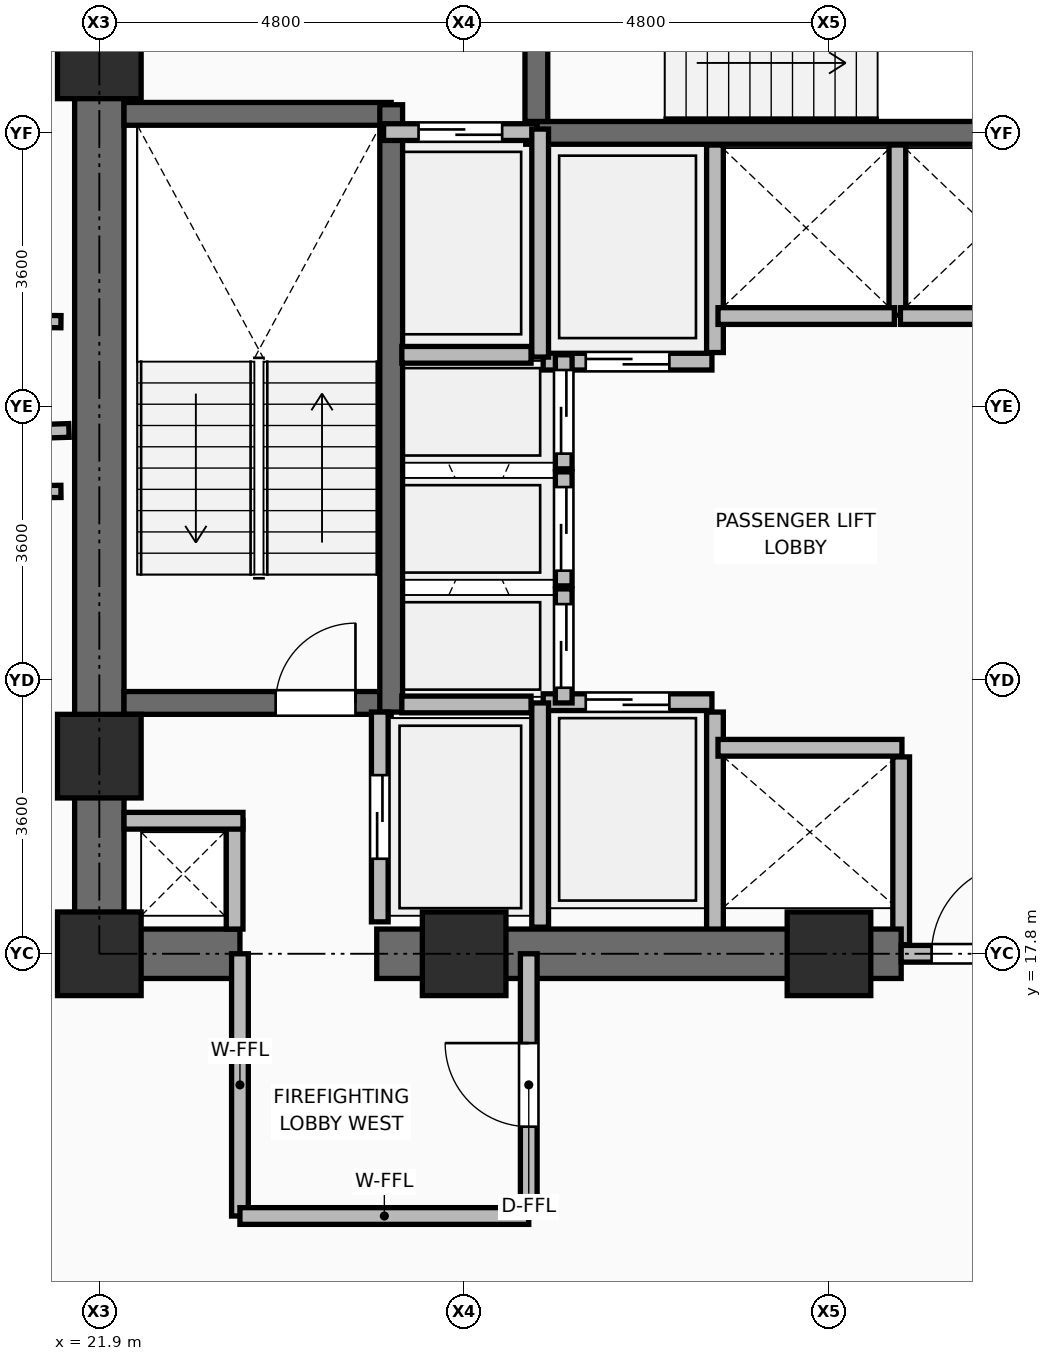
"""IFC4 building model, lengths in metres.
Left out: names, types, materials, properties, quantities, classifications, styles, units other than length and angle.
Written with IfcOpenShell. Run it as: python <this file> out.ifc"""

import sys

from ifc_helpers import new_model, si_unit, direction, frame, frame_2d, origin, origin_2d, place, context, subcontext, project, spatial, rectangle, extrude, element, fill, save


model = new_model("IFC4")
c1 = context("Model", 3, precision=1e-05, world=origin(), true_north=direction((0.0, 1.0)))
c2 = subcontext(c1, "Body", "Model", "MODEL_VIEW")
j1 = project(units=[si_unit("LENGTHUNIT", "METRE"), si_unit("PLANEANGLEUNIT", "RADIAN")], contexts=[c1])
p1 = place(None, origin())
s1 = spatial("IfcSite", under=j1, at=p1, CompositionType="ELEMENT")
p2 = place(p1, origin())
s2 = spatial("IfcBuilding", under=s1, at=p2, CompositionType="ELEMENT")
p3 = place(p2, frame((0.0, 0.0, 87.0)))
s3 = spatial("IfcBuildingStorey", under=s2, at=p3, CompositionType="ELEMENT", Elevation=87.0)
for number, where, z_axis, x_axis in (
    (1, (21.9, 17.8, 0.0), (0.0, 0.0, 1.0), (1.0, 0.0, 0.0)),
    (2, (26.7, 17.8, 0.0), (0.0, 0.0, 1.0), (1.0, 0.0, 0.0)),
    (3, (31.5, 17.8, 0.0), (0.0, 0.0, 1.0), (1.0, 0.0, 0.0)),
    (4, (21.9, 20.4, 0.0), (0.0, 0.0, 1.0), (1.0, 0.0, 0.0)),
    (5, (21.9, 29.6, 0.0), (0.0, 0.0, 1.0), (1.0, 0.0, 0.0)),
):
    element("IfcColumn", number, at=place(p3, frame(where, z_axis=z_axis, x_axis=x_axis)), inside=s3, PredefinedType="COLUMN", context=c2, shape_type="SweptSolid", body=[
        extrude(rectangle(XDim=1.1, YDim=1.1, at=origin_2d()), origin(), (0.0, 0.0, 1.0), 3.75),
    ])
p4 = place(p3, frame((30.0, 18.08, 0.0), z_axis=(0.0, 0.0, 1.0), x_axis=(0.0, 1.0, 0.0)))
e6 = element("IfcWall", 6, at=p4, inside=s3, PredefinedType="PARTITIONING", context=c2, shape_type="SweptSolid", body=[
    extrude(rectangle(XDim=2.9, YDim=0.22, at=frame_2d((1.45, 0.0))), origin(), (0.0, 0.0, 1.0), 3.475),
])
p5 = place(p3, frame((32.45, 17.92, 0.0), z_axis=(0.0, 0.0, 1.0), x_axis=(0.0, 1.0, 0.0)))
e7 = element("IfcWall", 7, at=p5, inside=s3, PredefinedType="PARTITIONING", context=c2, shape_type="SweptSolid", body=[
    extrude(rectangle(XDim=2.47, YDim=0.22, at=frame_2d((1.235, 0.0))), origin(), (0.0, 0.0, 1.0), 2.858),
])
p6 = place(p3, frame((30.0, 25.71, 0.0), z_axis=(0.0, 0.0, 1.0), x_axis=(0.0, 1.0, 0.0)))
e8 = element("IfcWall", 8, at=p6, inside=s3, PredefinedType="PARTITIONING", context=c2, shape_type="SweptSolid", body=[
    extrude(rectangle(XDim=2.73, YDim=0.22, at=frame_2d((1.365, 0.0))), origin(), (0.0, 0.0, 1.0), 3.475),
])
p7 = place(p3, frame((32.4, 26.2, 0.0), z_axis=(0.0, 0.0, 1.0), x_axis=(0.0, 1.0, 0.0)))
e9 = element("IfcWall", 9, at=p7, inside=s3, PredefinedType="PARTITIONING", context=c2, shape_type="SweptSolid", body=[
    extrude(rectangle(XDim=2.24, YDim=0.22, at=frame_2d((1.12, 0.0))), origin(), (0.0, 0.0, 1.0), 3.475),
])
p8 = place(p3, frame((21.575, 17.8, 0.0), z_axis=(0.0, 0.0, 1.0), x_axis=(1.0, 0.0, 0.0)))
e10 = element("IfcWall", 10, at=p8, inside=s3, PredefinedType="SHEAR", context=c2, shape_type="SweptSolid", body=[
    extrude(rectangle(XDim=2.175, YDim=0.65, at=frame_2d((1.087, 0.0))), origin(), (0.0, 0.0, 1.0), 3.5),
])
p9 = place(p3, frame((25.55, 17.8, 0.0), z_axis=(0.0, 0.0, 1.0), x_axis=(1.0, 0.0, 0.0)))
e11 = element("IfcWall", 11, at=p9, inside=s3, PredefinedType="SHEAR", context=c2, shape_type="SweptSolid", body=[
    extrude(rectangle(XDim=6.9, YDim=0.65, at=frame_2d((3.45, 0.0))), origin(), (0.0, 0.0, 1.0), 3.5),
])
p10 = place(p3, frame((32.45, 17.8, 0.0), z_axis=(0.0, 0.0, 1.0), x_axis=(1.0, 0.0, 0.0)))
e12 = element("IfcWall", 12, at=p10, inside=s3, PredefinedType="PARTITIONING", context=c2, shape_type="SweptSolid", body=[
    extrude(rectangle(XDim=2.5, YDim=0.22, at=frame_2d((1.25, 0.0))), origin(), (0.0, 0.0, 1.0), 2.858),
])
p11 = place(p10, frame((0.4, 0.0, 0.0)))
e13 = element("IfcOpeningElement", 13, at=p11, cuts=e12, PredefinedType="OPENING", context=c2, shape_type="SweptSolid", body=[
    extrude(rectangle(XDim=1.2, YDim=2.1, at=frame_2d((0.6, 1.05))), frame((0.0, 0.12, 0.0), z_axis=(0.0, -1.0, 0.0), x_axis=(1.0, 0.0, 0.0)), (0.0, 0.0, 1.0), 0.24),
])
p12 = place(p3, frame((21.9, 18.125, 0.0), z_axis=(0.0, 0.0, 1.0), x_axis=(0.0, 1.0, 0.0)))
e14 = element("IfcWall", 14, at=p12, inside=s3, PredefinedType="SHEAR", context=c2, shape_type="SweptSolid", body=[
    extrude(rectangle(XDim=14.0, YDim=0.65, at=frame_2d((7.0, 0.0))), origin(), (0.0, 0.0, 1.0), 3.5),
])
p13 = place(p3, frame((22.225, 21.1, 0.0), z_axis=(0.0, 0.0, 1.0), x_axis=(1.0, 0.0, 0.0)))
e15 = element("IfcWall", 15, at=p13, inside=s3, PredefinedType="SHEAR", context=c2, shape_type="SweptSolid", body=[
    extrude(rectangle(XDim=3.515, YDim=0.3, at=frame_2d((1.757, 0.0))), origin(), (0.0, 0.0, 1.0), 3.5),
])
p14 = place(p13, frame((1.995, 0.0, 0.0)))
e16 = element("IfcOpeningElement", 16, at=p14, cuts=e15, PredefinedType="OPENING", context=c2, shape_type="SweptSolid", body=[
    extrude(rectangle(XDim=1.05, YDim=2.1, at=frame_2d((0.525, 1.05))), frame((0.0, 0.16, 0.0), z_axis=(0.0, -1.0, 0.0), x_axis=(1.0, 0.0, 0.0)), (0.0, 0.0, 1.0), 0.32),
])
p15 = place(p3, frame((22.225, 28.85, 0.0), z_axis=(0.0, 0.0, 1.0), x_axis=(1.0, 0.0, 0.0)))
e17 = element("IfcWall", 17, at=p15, inside=s3, PredefinedType="SHEAR", context=c2, shape_type="SweptSolid", body=[
    extrude(rectangle(XDim=3.515, YDim=0.3, at=frame_2d((1.757, 0.0))), origin(), (0.0, 0.0, 1.0), 3.5),
])
p16 = place(p3, frame((25.74, 20.98, 0.0), z_axis=(0.0, 0.0, 1.0), x_axis=(0.0, 1.0, 0.0)))
e18 = element("IfcWall", 18, at=p16, inside=s3, PredefinedType="SHEAR", context=c2, shape_type="SweptSolid", body=[
    extrude(rectangle(XDim=7.99, YDim=0.3, at=frame_2d((3.995, 0.0))), origin(), (0.0, 0.0, 1.0), 3.5),
])
p17 = place(p3, frame((27.51, 28.6, 0.0), z_axis=(0.0, 0.0, 1.0), x_axis=(1.0, 0.0, 0.0)))
e19 = element("IfcWall", 19, at=p17, inside=s3, PredefinedType="SHEAR", context=c2, shape_type="SweptSolid", body=[
    extrude(rectangle(XDim=8.03, YDim=0.3, at=frame_2d((4.015, 0.0))), origin(), (0.0, 0.0, 1.0), 3.5),
])
p18 = place(p3, frame((27.65, 28.75, 0.0), z_axis=(0.0, 0.0, 1.0), x_axis=(0.0, 1.0, 0.0)))
e20 = element("IfcWall", 20, at=p18, inside=s3, PredefinedType="SHEAR", context=c2, shape_type="SweptSolid", body=[
    extrude(rectangle(XDim=3.375, YDim=0.3, at=frame_2d((1.688, 0.0))), origin(), (0.0, 0.0, 1.0), 3.5),
])
p19 = place(p18, frame((1.0, 0.0, 0.0)))
e21 = element("IfcOpeningElement", 21, at=p19, cuts=e20, PredefinedType="OPENING", context=c2, shape_type="SweptSolid", body=[
    extrude(rectangle(XDim=1.05, YDim=2.1, at=frame_2d((0.525, 1.05))), frame((0.0, 0.16, 0.0), z_axis=(0.0, -1.0, 0.0), x_axis=(1.0, 0.0, 0.0)), (0.0, 0.0, 1.0), 0.32),
])
p20 = place(p3, frame((23.68, 18.125, 0.0), z_axis=(0.0, 0.0, 1.0), x_axis=(0.0, 1.0, 0.0)))
e22 = element("IfcWall", 22, at=p20, inside=s3, PredefinedType="PARTITIONING", context=c2, shape_type="SweptSolid", body=[
    extrude(rectangle(XDim=1.425, YDim=0.22, at=frame_2d((0.712, 0.0))), origin(), (0.0, 0.0, 1.0), 3.48),
])
p21 = place(p3, frame((22.225, 19.55, 0.0), z_axis=(0.0, 0.0, 1.0), x_axis=(1.0, 0.0, 0.0)))
e23 = element("IfcWall", 23, at=p21, inside=s3, PredefinedType="PARTITIONING", context=c2, shape_type="SweptSolid", body=[
    extrude(rectangle(XDim=1.565, YDim=0.22, at=frame_2d((0.782, 0.0))), origin(), (0.0, 0.0, 1.0), 2.525),
])
p22 = place(p3, frame((25.59, 18.22, 0.0), z_axis=(0.0, 0.0, 1.0), x_axis=(0.0, 1.0, 0.0)))
e24 = element("IfcWall", 24, at=p22, inside=s3, PredefinedType="PARTITIONING", context=c2, shape_type="SweptSolid", body=[
    extrude(rectangle(XDim=2.76, YDim=0.22, at=frame_2d((1.38, 0.0))), origin(), (0.0, 0.0, 1.0), 3.48),
])
p23 = place(p22, frame((0.83, 0.0, 0.0)))
e25 = element("IfcOpeningElement", 25, at=p23, cuts=e24, PredefinedType="OPENING", context=c2, shape_type="SweptSolid", body=[
    extrude(rectangle(XDim=1.1, YDim=2.2, at=frame_2d((0.55, 1.1))), frame((0.0, 0.12, 0.0), z_axis=(0.0, -1.0, 0.0), x_axis=(1.0, 0.0, 0.0)), (0.0, 0.0, 1.0), 0.24),
])
p24 = place(p3, frame((25.64, 28.61, 0.0), z_axis=(0.0, 0.0, 1.0), x_axis=(1.0, 0.0, 0.0)))
e26 = element("IfcWall", 26, at=p24, inside=s3, PredefinedType="PARTITIONING", context=c2, shape_type="SweptSolid", body=[
    extrude(rectangle(XDim=2.02, YDim=0.22, at=frame_2d((1.01, 0.0))), origin(), (0.0, 0.0, 1.0), 3.48),
])
p25 = place(p24, frame((0.46, 0.0, 0.0)))
e27 = element("IfcOpeningElement", 27, at=p25, cuts=e26, PredefinedType="OPENING", context=c2, shape_type="SweptSolid", body=[
    extrude(rectangle(XDim=1.1, YDim=2.2, at=frame_2d((0.55, 1.1))), frame((0.0, 0.12, 0.0), z_axis=(0.0, -1.0, 0.0), x_axis=(1.0, 0.0, 0.0)), (0.0, 0.0, 1.0), 0.24),
])
p26 = place(p3, frame((27.74, 21.11, 0.0), z_axis=(0.0, 0.0, 1.0), x_axis=(1.0, 0.0, 0.0)))
e28 = element("IfcWall", 28, at=p26, inside=s3, PredefinedType="PARTITIONING", context=c2, shape_type="SweptSolid", body=[
    extrude(rectangle(XDim=2.22, YDim=0.22, at=frame_2d((1.11, 0.0))), origin(), (0.0, 0.0, 1.0), 3.48),
])
p27 = place(p26, frame((0.56, 0.0, 0.0)))
e29 = element("IfcOpeningElement", 29, at=p27, cuts=e28, PredefinedType="OPENING", context=c2, shape_type="SweptSolid", body=[
    extrude(rectangle(XDim=1.1, YDim=2.2, at=frame_2d((0.55, 1.1))), frame((0.0, 0.12, 0.0), z_axis=(0.0, -1.0, 0.0), x_axis=(1.0, 0.0, 0.0)), (0.0, 0.0, 1.0), 0.24),
])
p28 = place(p3, frame((27.74, 25.59, 0.0), z_axis=(0.0, 0.0, 1.0), x_axis=(1.0, 0.0, 0.0)))
e30 = element("IfcWall", 30, at=p28, inside=s3, PredefinedType="PARTITIONING", context=c2, shape_type="SweptSolid", body=[
    extrude(rectangle(XDim=2.22, YDim=0.22, at=frame_2d((1.11, 0.0))), origin(), (0.0, 0.0, 1.0), 3.48),
])
p29 = place(p28, frame((0.56, 0.0, 0.0)))
e31 = element("IfcOpeningElement", 31, at=p29, cuts=e30, PredefinedType="OPENING", context=c2, shape_type="SweptSolid", body=[
    extrude(rectangle(XDim=1.1, YDim=2.2, at=frame_2d((0.55, 1.1))), frame((0.0, 0.12, 0.0), z_axis=(0.0, -1.0, 0.0), x_axis=(1.0, 0.0, 0.0)), (0.0, 0.0, 1.0), 0.24),
])
p30 = place(p3, frame((30.04, 20.51, 0.0), z_axis=(0.0, 0.0, 1.0), x_axis=(1.0, 0.0, 0.0)))
e32 = element("IfcWall", 32, at=p30, inside=s3, PredefinedType="PARTITIONING", context=c2, shape_type="SweptSolid", body=[
    extrude(rectangle(XDim=2.42, YDim=0.22, at=frame_2d((1.21, 0.0))), origin(), (0.0, 0.0, 1.0), 3.48),
])
for number, where, z_axis, x_axis in (
    (33, (30.04, 26.19, 0.0), (0.0, 0.0, 1.0), (1.0, 0.0, 0.0)),
    (34, (32.44, 26.19, 0.0), (0.0, 0.0, 1.0), (1.0, 0.0, 0.0)),
):
    element("IfcWall", number, at=place(p3, frame(where, z_axis=z_axis, x_axis=x_axis)), inside=s3, PredefinedType="PARTITIONING", context=c2, shape_type="SweptSolid", body=[
        extrude(rectangle(XDim=2.32, YDim=0.22, at=frame_2d((1.16, 0.0))), origin(), (0.0, 0.0, 1.0), 3.48),
    ])
p31 = place(p3, frame((28.01, 21.1, 0.0), z_axis=(0.0, 0.0, 1.0), x_axis=(0.0, 1.0, 0.0)))
e35 = element("IfcWall", 35, at=p31, inside=s3, PredefinedType="PARTITIONING", context=c2, shape_type="SweptSolid", body=[
    extrude(rectangle(XDim=1.5, YDim=0.22, at=frame_2d((0.75, 0.0))), origin(), (0.0, 0.0, 1.0), 3.48),
])
p32 = place(p31, frame((0.2, 0.0, 0.0)))
e36 = element("IfcOpeningElement", 36, at=p32, cuts=e35, PredefinedType="OPENING", context=c2, shape_type="SweptSolid", body=[
    extrude(rectangle(XDim=1.1, YDim=2.2, at=frame_2d((0.55, 1.1))), frame((0.0, 0.12, 0.0), z_axis=(0.0, -1.0, 0.0), x_axis=(1.0, 0.0, 0.0)), (0.0, 0.0, 1.0), 0.24),
])
p33 = place(p3, frame((28.01, 22.64, 0.0), z_axis=(0.0, 0.0, 1.0), x_axis=(0.0, 1.0, 0.0)))
e37 = element("IfcWall", 37, at=p33, inside=s3, PredefinedType="PARTITIONING", context=c2, shape_type="SweptSolid", body=[
    extrude(rectangle(XDim=1.5, YDim=0.22, at=frame_2d((0.75, 0.0))), origin(), (0.0, 0.0, 1.0), 3.48),
])
p34 = place(p33, frame((0.2, 0.0, 0.0)))
e38 = element("IfcOpeningElement", 38, at=p34, cuts=e37, PredefinedType="OPENING", context=c2, shape_type="SweptSolid", body=[
    extrude(rectangle(XDim=1.1, YDim=2.2, at=frame_2d((0.55, 1.1))), frame((0.0, 0.12, 0.0), z_axis=(0.0, -1.0, 0.0), x_axis=(1.0, 0.0, 0.0)), (0.0, 0.0, 1.0), 0.24),
])
p35 = place(p3, frame((28.01, 24.18, 0.0), z_axis=(0.0, 0.0, 1.0), x_axis=(0.0, 1.0, 0.0)))
e39 = element("IfcWall", 39, at=p35, inside=s3, PredefinedType="PARTITIONING", context=c2, shape_type="SweptSolid", body=[
    extrude(rectangle(XDim=1.5, YDim=0.22, at=frame_2d((0.75, 0.0))), origin(), (0.0, 0.0, 1.0), 3.48),
])
p36 = place(p35, frame((0.2, 0.0, 0.0)))
e40 = element("IfcOpeningElement", 40, at=p36, cuts=e39, PredefinedType="OPENING", context=c2, shape_type="SweptSolid", body=[
    extrude(rectangle(XDim=1.1, YDim=2.2, at=frame_2d((0.55, 1.1))), frame((0.0, 0.12, 0.0), z_axis=(0.0, -1.0, 0.0), x_axis=(1.0, 0.0, 0.0)), (0.0, 0.0, 1.0), 0.24),
])
p37 = place(p3, frame((27.7, 18.15, 0.0), z_axis=(0.0, 0.0, 1.0), x_axis=(0.0, 1.0, 0.0)))
e41 = element("IfcWall", 41, at=p37, inside=s3, PredefinedType="PARTITIONING", context=c2, shape_type="SweptSolid", body=[
    extrude(rectangle(XDim=2.95, YDim=0.22, at=frame_2d((1.475, 0.0))), origin(), (0.0, 0.0, 1.0), 3.48),
])
p38 = place(p3, frame((27.7, 25.65, 0.0), z_axis=(0.0, 0.0, 1.0), x_axis=(0.0, 1.0, 0.0)))
e42 = element("IfcWall", 42, at=p38, inside=s3, PredefinedType="PARTITIONING", context=c2, shape_type="SweptSolid", body=[
    extrude(rectangle(XDim=3.0, YDim=0.22, at=frame_2d((1.5, 0.0))), origin(), (0.0, 0.0, 1.0), 3.48),
])
for number, where, z_axis, x_axis in (
    (43, (25.88, 21.08, 0.0), (0.0, 0.0, 1.0), (1.0, 0.0, 0.0)),
    (44, (25.88, 25.68, 0.0), (0.0, 0.0, 1.0), (1.0, 0.0, 0.0)),
):
    element("IfcWall", number, at=place(p3, frame(where, z_axis=z_axis, x_axis=x_axis)), inside=s3, PredefinedType="PARTITIONING", context=c2, shape_type="SweptSolid", body=[
        extrude(rectangle(XDim=1.7, YDim=0.22, at=frame_2d((0.85, 0.0))), origin(), (0.0, 0.0, 1.0), 3.48),
    ])
p39 = place(p3, frame((23.75, 14.35, 0.0), z_axis=(0.0, 0.0, 1.0), x_axis=(0.0, 1.0, 0.0)))
e45 = element("IfcWall", 45, at=p39, inside=s3, PredefinedType="PARTITIONING", context=c2, shape_type="SweptSolid", body=[
    extrude(rectangle(XDim=3.45, YDim=0.22, at=frame_2d((1.725, 0.0))), origin(), (0.0, 0.0, 1.0), 2.858),
])
p40 = place(p3, frame((23.75, 14.35, 0.0), z_axis=(0.0, 0.0, 1.0), x_axis=(1.0, 0.0, 0.0)))
e46 = element("IfcWall", 46, at=p40, inside=s3, PredefinedType="PARTITIONING", context=c2, shape_type="SweptSolid", body=[
    extrude(rectangle(XDim=3.8, YDim=0.22, at=frame_2d((1.9, 0.0))), origin(), (0.0, 0.0, 1.0), 3.48),
])
p41 = place(p3, frame((27.55, 14.35, 0.0), z_axis=(0.0, 0.0, 1.0), x_axis=(0.0, 1.0, 0.0)))
e47 = element("IfcWall", 47, at=p41, inside=s3, PredefinedType="PARTITIONING", context=c2, shape_type="SweptSolid", body=[
    extrude(rectangle(XDim=3.45, YDim=0.22, at=frame_2d((1.725, 0.0))), origin(), (0.0, 0.0, 1.0), 2.858),
])
p42 = place(p41, frame((1.175, 0.0, 0.0)))
e48 = element("IfcOpeningElement", 48, at=p42, cuts=e47, PredefinedType="OPENING", context=c2, shape_type="SweptSolid", body=[
    extrude(rectangle(XDim=1.1, YDim=2.1, at=frame_2d((0.55, 1.05))), frame((0.0, 0.12, 0.0), z_axis=(0.0, -1.0, 0.0), x_axis=(1.0, 0.0, 0.0)), (0.0, 0.0, 1.0), 0.24),
])
p43 = place(p3, frame((21.395, 26.116, 0.0), z_axis=(0.0, 0.0, 1.0), x_axis=(-0.999954689974, 0.009519348646, 0.0)))
e49 = element("IfcWall", 49, at=p43, inside=s3, PredefinedType="PARTITIONING", context=c2, shape_type="SweptSolid", body=[
    extrude(rectangle(XDim=2.308, YDim=0.16, at=frame_2d((1.154, 0.0))), origin(), (0.0, 0.0, 1.0), 3.48),
])
p44 = place(p43, frame((0.16, 0.0, 0.0)))
e50 = element("IfcOpeningElement", 50, at=p44, cuts=e49, PredefinedType="OPENING", context=c2, shape_type="SweptSolid", body=[
    extrude(rectangle(XDim=1.2, YDim=2.1, at=frame_2d((0.6, 1.05))), frame((0.0, 0.09, 0.0), z_axis=(0.0, -1.0, 0.0), x_axis=(1.0, 0.0, 0.0)), (0.0, 0.0, 1.0), 0.18),
])
p45 = place(p3, frame((19.086, 23.858, 0.0), z_axis=(0.0, 0.0, 1.0), x_axis=(0.999940706484, 0.010889605918, 0.0)))
e51 = element("IfcWall", 51, at=p45, inside=s3, PredefinedType="PARTITIONING", context=c2, shape_type="SweptSolid", body=[
    extrude(rectangle(XDim=2.309, YDim=0.16, at=frame_2d((1.155, 0.0))), origin(), (0.0, 0.0, 1.0), 3.48),
])
p46 = place(p3, frame((21.5, 24.685, 0.0), z_axis=(0.0, 0.0, 1.0), x_axis=(-0.999501988986, -0.031555887143, 0.0)))
e52 = element("IfcWall", 52, at=p46, inside=s3, PredefinedType="PARTITIONING", context=c2, shape_type="SweptSolid", body=[
    extrude(rectangle(XDim=17.872, YDim=0.18, at=frame_2d((8.936, 0.0))), origin(), (0.0, 0.0, 1.0), 2.525),
])
p47 = place(p11, origin())
e53 = element("IfcDoor", 53, at=p47, inside=s3, OperationType="SINGLE_SWING_RIGHT", PredefinedType="DOOR", context=c2, shape_type="SweptSolid", body=[
    extrude(rectangle(XDim=1.2, YDim=2.1, at=frame_2d((0.6, 1.05))), frame((0.0, 0.025, 0.0), z_axis=(0.0, -1.0, 0.0), x_axis=(1.0, 0.0, 0.0)), (0.0, 0.0, 1.0), 0.05),
])
fill(e13, e53)
p48 = place(p14, origin())
e54 = element("IfcDoor", 54, at=p48, inside=s3, OperationType="SINGLE_SWING_RIGHT", PredefinedType="DOOR", context=c2, shape_type="SweptSolid", body=[
    extrude(rectangle(XDim=1.05, YDim=2.1, at=frame_2d((0.525, 1.05))), frame((0.0, 0.025, 0.0), z_axis=(0.0, -1.0, 0.0), x_axis=(1.0, 0.0, 0.0)), (0.0, 0.0, 1.0), 0.05),
])
fill(e16, e54)
p49 = place(p23, origin())
e55 = element("IfcDoor", 55, at=p49, inside=s3, OperationType="DOUBLE_DOOR_SLIDING", PredefinedType="DOOR", context=c2, shape_type="SweptSolid", body=[
    extrude(rectangle(XDim=1.1, YDim=2.2, at=frame_2d((0.55, 1.1))), frame((0.0, 0.025, 0.0), z_axis=(0.0, -1.0, 0.0), x_axis=(1.0, 0.0, 0.0)), (0.0, 0.0, 1.0), 0.05),
])
fill(e25, e55)
p50 = place(p25, origin())
e56 = element("IfcDoor", 56, at=p50, inside=s3, OperationType="DOUBLE_DOOR_SLIDING", PredefinedType="DOOR", context=c2, shape_type="SweptSolid", body=[
    extrude(rectangle(XDim=1.1, YDim=2.2, at=frame_2d((0.55, 1.1))), frame((0.0, 0.025, 0.0), z_axis=(0.0, -1.0, 0.0), x_axis=(1.0, 0.0, 0.0)), (0.0, 0.0, 1.0), 0.05),
])
fill(e27, e56)
p51 = place(p27, origin())
e57 = element("IfcDoor", 57, at=p51, inside=s3, OperationType="DOUBLE_DOOR_SLIDING", PredefinedType="DOOR", context=c2, shape_type="SweptSolid", body=[
    extrude(rectangle(XDim=1.1, YDim=2.2, at=frame_2d((0.55, 1.1))), frame((0.0, 0.025, 0.0), z_axis=(0.0, -1.0, 0.0), x_axis=(1.0, 0.0, 0.0)), (0.0, 0.0, 1.0), 0.05),
])
fill(e29, e57)
p52 = place(p29, frame((1.1, 0.0, 0.0), z_axis=(0.0, 0.0, 1.0), x_axis=(-1.0, 0.0, 0.0)))
e58 = element("IfcDoor", 58, at=p52, inside=s3, OperationType="DOUBLE_DOOR_SLIDING", PredefinedType="DOOR", context=c2, shape_type="SweptSolid", body=[
    extrude(rectangle(XDim=1.1, YDim=2.2, at=frame_2d((0.55, 1.1))), frame((0.0, 0.025, 0.0), z_axis=(0.0, -1.0, 0.0), x_axis=(1.0, 0.0, 0.0)), (0.0, 0.0, 1.0), 0.05),
])
fill(e31, e58)
p53 = place(p32, frame((1.1, 0.0, 0.0), z_axis=(0.0, 0.0, 1.0), x_axis=(-1.0, 0.0, 0.0)))
e59 = element("IfcDoor", 59, at=p53, inside=s3, OperationType="DOUBLE_DOOR_SLIDING", PredefinedType="DOOR", context=c2, shape_type="SweptSolid", body=[
    extrude(rectangle(XDim=1.1, YDim=2.2, at=frame_2d((0.55, 1.1))), frame((0.0, 0.025, 0.0), z_axis=(0.0, -1.0, 0.0), x_axis=(1.0, 0.0, 0.0)), (0.0, 0.0, 1.0), 0.05),
])
fill(e36, e59)
p54 = place(p34, frame((1.1, 0.0, 0.0), z_axis=(0.0, 0.0, 1.0), x_axis=(-1.0, 0.0, 0.0)))
e60 = element("IfcDoor", 60, at=p54, inside=s3, OperationType="DOUBLE_DOOR_SLIDING", PredefinedType="DOOR", context=c2, shape_type="SweptSolid", body=[
    extrude(rectangle(XDim=1.1, YDim=2.2, at=frame_2d((0.55, 1.1))), frame((0.0, 0.025, 0.0), z_axis=(0.0, -1.0, 0.0), x_axis=(1.0, 0.0, 0.0)), (0.0, 0.0, 1.0), 0.05),
])
fill(e38, e60)
p55 = place(p36, frame((1.1, 0.0, 0.0), z_axis=(0.0, 0.0, 1.0), x_axis=(-1.0, 0.0, 0.0)))
e61 = element("IfcDoor", 61, at=p55, inside=s3, OperationType="DOUBLE_DOOR_SLIDING", PredefinedType="DOOR", context=c2, shape_type="SweptSolid", body=[
    extrude(rectangle(XDim=1.1, YDim=2.2, at=frame_2d((0.55, 1.1))), frame((0.0, 0.025, 0.0), z_axis=(0.0, -1.0, 0.0), x_axis=(1.0, 0.0, 0.0)), (0.0, 0.0, 1.0), 0.05),
])
fill(e40, e61)
p56 = place(p42, origin())
e62 = element("IfcDoor", 62, at=p56, inside=s3, OperationType="SINGLE_SWING_RIGHT", PredefinedType="DOOR", context=c2, shape_type="SweptSolid", body=[
    extrude(rectangle(XDim=1.1, YDim=2.1, at=frame_2d((0.55, 1.05))), frame((0.0, 0.025, 0.0), z_axis=(0.0, -1.0, 0.0), x_axis=(1.0, 0.0, 0.0)), (0.0, 0.0, 1.0), 0.05),
])
fill(e48, e62)
save(model, sys.argv[1])
